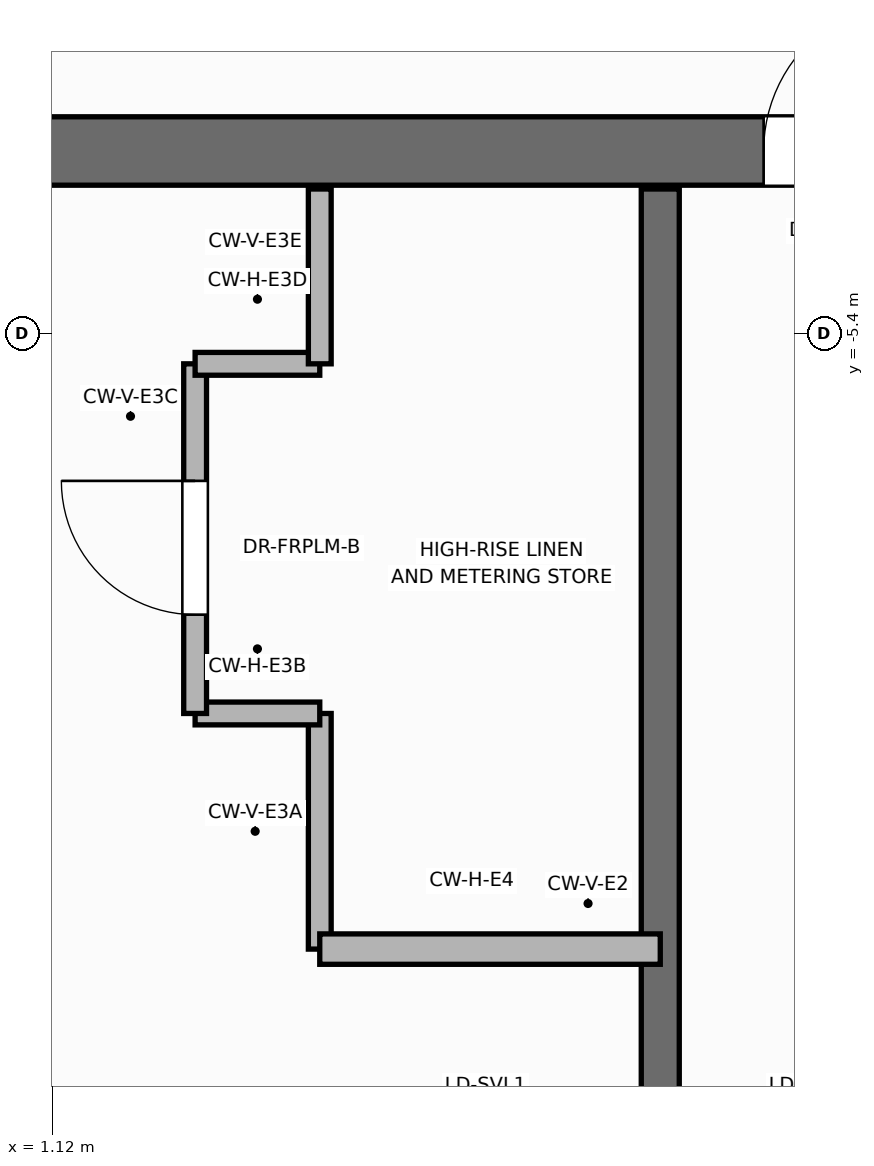
"""IFC4 building model, lengths in metres.
Left out: names, types, materials, properties, quantities, classifications, styles, units other than length and angle.
Written with IfcOpenShell. Run it as: python <this file> out.ifc"""

import sys

from ifc_helpers import new_model, si_unit, direction, frame, frame_2d, origin, place, context, subcontext, project, spatial, rectangle, extrude, element, fill, save


model = new_model("IFC4")
c1 = context("Model", 3, precision=1e-05, world=origin(), true_north=direction((0.0, 1.0)))
c2 = subcontext(c1, "Body", "Model", "MODEL_VIEW")
j1 = project(units=[si_unit("LENGTHUNIT", "METRE"), si_unit("PLANEANGLEUNIT", "RADIAN")], contexts=[c1])
p1 = place(None, origin())
s1 = spatial("IfcSite", under=j1, at=p1, CompositionType="ELEMENT")
p2 = place(p1, origin())
s2 = spatial("IfcBuilding", under=s1, at=p2, CompositionType="ELEMENT")
p3 = place(p2, frame((0.0, 0.0, 297.6)))
s3 = spatial("IfcBuildingStorey", under=s2, at=p3, CompositionType="ELEMENT", Elevation=297.6)
p4 = place(p3, frame((2.88, -9.45, 0.0), z_axis=(0.0, 0.0, 1.0), x_axis=(0.0, 1.0, 0.0)))
e1 = element("IfcWall", 1, at=p4, inside=s3, PredefinedType="PARTITIONING", context=c2, shape_type="SweptSolid", body=[
    extrude(rectangle(XDim=1.55, YDim=0.15, at=frame_2d((0.775, 0.0))), origin(), (0.0, 0.0, 1.0), 3.88),
])
p5 = place(p3, frame((2.06, -7.9, 0.0), z_axis=(0.0, 0.0, 1.0), x_axis=(1.0, 0.0, 0.0)))
e2 = element("IfcWall", 2, at=p5, inside=s3, PredefinedType="PARTITIONING", context=c2, shape_type="SweptSolid", body=[
    extrude(rectangle(XDim=0.82, YDim=0.15, at=frame_2d((0.41, 0.0))), origin(), (0.0, 0.0, 1.0), 3.88),
])
p6 = place(p3, frame((2.06, -7.9, 0.0), z_axis=(0.0, 0.0, 1.0), x_axis=(0.0, 1.0, 0.0)))
e3 = element("IfcWall", 3, at=p6, inside=s3, PredefinedType="PARTITIONING", context=c2, shape_type="SweptSolid", body=[
    extrude(rectangle(XDim=2.3, YDim=0.15, at=frame_2d((1.15, 0.0))), origin(), (0.0, 0.0, 1.0), 3.88),
])
p7 = place(p6, frame((0.65, 0.0, 0.0)))
e4 = element("IfcOpeningElement", 4, at=p7, cuts=e3, PredefinedType="OPENING", context=c2, shape_type="SweptSolid", body=[
    extrude(rectangle(XDim=0.886, YDim=2.104, at=frame_2d((0.44, 1.052))), frame((0.0, 0.085, 0.0), z_axis=(0.0, -1.0, 0.0), x_axis=(1.0, 0.0, 0.0)), (0.0, 0.0, 1.0), 0.17),
])
p8 = place(p3, frame((2.06, -5.6, 0.0), z_axis=(0.0, 0.0, 1.0), x_axis=(1.0, 0.0, 0.0)))
e5 = element("IfcWall", 5, at=p8, inside=s3, PredefinedType="PARTITIONING", context=c2, shape_type="SweptSolid", body=[
    extrude(rectangle(XDim=0.82, YDim=0.15, at=frame_2d((0.41, 0.0))), origin(), (0.0, 0.0, 1.0), 3.88),
])
p9 = place(p3, frame((2.88, -5.6, 0.0), z_axis=(0.0, 0.0, 1.0), x_axis=(0.0, 1.0, 0.0)))
e6 = element("IfcWall", 6, at=p9, inside=s3, PredefinedType="PARTITIONING", context=c2, shape_type="SweptSolid", body=[
    extrude(rectangle(XDim=1.15, YDim=0.15, at=frame_2d((0.575, 0.0))), origin(), (0.0, 0.0, 1.0), 3.88),
])
p10 = place(p3, frame((-12.65, -4.2, 0.0), z_axis=(0.0, 0.0, 1.0), x_axis=(1.0, 0.0, 0.0)))
e7 = element("IfcWall", 7, at=p10, inside=s3, PredefinedType="SHEAR", context=c2, shape_type="SweptSolid", body=[
    extrude(rectangle(XDim=25.3, YDim=0.45, at=frame_2d((12.65, 0.0))), origin(), (0.0, 0.0, 1.0), 4.2),
])
p11 = place(p10, frame((1.85, 0.0, 0.0)))
e8 = element("IfcOpeningElement", 8, at=p11, cuts=e7, PredefinedType="OPENING", context=c2, shape_type="SweptSolid", body=[
    extrude(rectangle(XDim=0.756, YDim=2.054, at=frame_2d((0.375, 1.027))), frame((0.0, 0.235, 0.0), z_axis=(0.0, -1.0, 0.0), x_axis=(1.0, 0.0, 0.0)), (0.0, 0.0, 1.0), 0.47),
])
p12 = place(p10, frame((22.65, 0.0, 0.0)))
e9 = element("IfcOpeningElement", 9, at=p12, cuts=e7, PredefinedType="OPENING", context=c2, shape_type="SweptSolid", body=[
    extrude(rectangle(XDim=0.756, YDim=2.054, at=frame_2d((0.375, 1.027))), frame((0.0, 0.235, 0.0), z_axis=(0.0, -1.0, 0.0), x_axis=(1.0, 0.0, 0.0)), (0.0, 0.0, 1.0), 0.47),
])
p13 = place(p10, frame((5.85, 0.0, 0.0)))
e10 = element("IfcOpeningElement", 10, at=p13, cuts=e7, PredefinedType="OPENING", context=c2, shape_type="SweptSolid", body=[
    extrude(rectangle(XDim=1.006, YDim=2.104, at=frame_2d((0.5, 1.052))), frame((0.0, 0.235, 0.0), z_axis=(0.0, -1.0, 0.0), x_axis=(1.0, 0.0, 0.0)), (0.0, 0.0, 1.0), 0.47),
])
p14 = place(p10, frame((10.35, 0.0, 0.0)))
e11 = element("IfcOpeningElement", 11, at=p14, cuts=e7, PredefinedType="OPENING", context=c2, shape_type="SweptSolid", body=[
    extrude(rectangle(XDim=1.406, YDim=2.154, at=frame_2d((0.7, 1.077))), frame((0.0, 0.235, 0.0), z_axis=(0.0, -1.0, 0.0), x_axis=(1.0, 0.0, 0.0)), (0.0, 0.0, 1.0), 0.47),
])
p15 = place(p10, frame((18.45, 0.0, 0.0)))
e12 = element("IfcOpeningElement", 12, at=p15, cuts=e7, PredefinedType="OPENING", context=c2, shape_type="SweptSolid", body=[
    extrude(rectangle(XDim=1.006, YDim=2.104, at=frame_2d((0.5, 1.052))), frame((0.0, 0.235, 0.0), z_axis=(0.0, -1.0, 0.0), x_axis=(1.0, 0.0, 0.0)), (0.0, 0.0, 1.0), 0.47),
])
p16 = place(p3, frame((5.12, -13.85, 0.0), z_axis=(0.0, 0.0, 1.0), x_axis=(0.0, 1.0, 0.0)))
e13 = element("IfcWall", 13, at=p16, inside=s3, PredefinedType="SHEAR", context=c2, shape_type="SweptSolid", body=[
    extrude(rectangle(XDim=9.4, YDim=0.25, at=frame_2d((4.7, 0.0))), origin(), (0.0, 0.0, 1.0), 4.2),
])
p17 = place(p3, frame((2.88, -9.45, 0.0), z_axis=(0.0, 0.0, 1.0), x_axis=(1.0, 0.0, 0.0)))
e14 = element("IfcWall", 14, at=p17, inside=s3, PredefinedType="SOLIDWALL", context=c2, shape_type="SweptSolid", body=[
    extrude(rectangle(XDim=2.24, YDim=0.2, at=frame_2d((1.12, 0.0))), origin(), (0.0, 0.0, 1.0), 3.88),
])
p18 = place(p7, origin())
e15 = element("IfcDoor", 15, at=p18, inside=s3, OperationType="SINGLE_SWING_RIGHT", PredefinedType="DOOR", context=c2, shape_type="SweptSolid", body=[
    extrude(rectangle(XDim=0.88, YDim=2.1, at=frame_2d((0.44, 1.05))), frame((0.0, 0.025, 0.0), z_axis=(0.0, -1.0, 0.0), x_axis=(1.0, 0.0, 0.0)), (0.0, 0.0, 1.0), 0.05),
])
fill(e4, e15)
p19 = place(p15, origin())
e16 = element("IfcDoor", 16, at=p19, inside=s3, OperationType="SINGLE_SWING_RIGHT", PredefinedType="DOOR", context=c2, shape_type="SweptSolid", body=[
    extrude(rectangle(XDim=1.0, YDim=2.1, at=frame_2d((0.5, 1.05))), frame((0.0, 0.025, 0.0), z_axis=(0.0, -1.0, 0.0), x_axis=(1.0, 0.0, 0.0)), (0.0, 0.0, 1.0), 0.05),
])
fill(e12, e16)
save(model, sys.argv[1])
